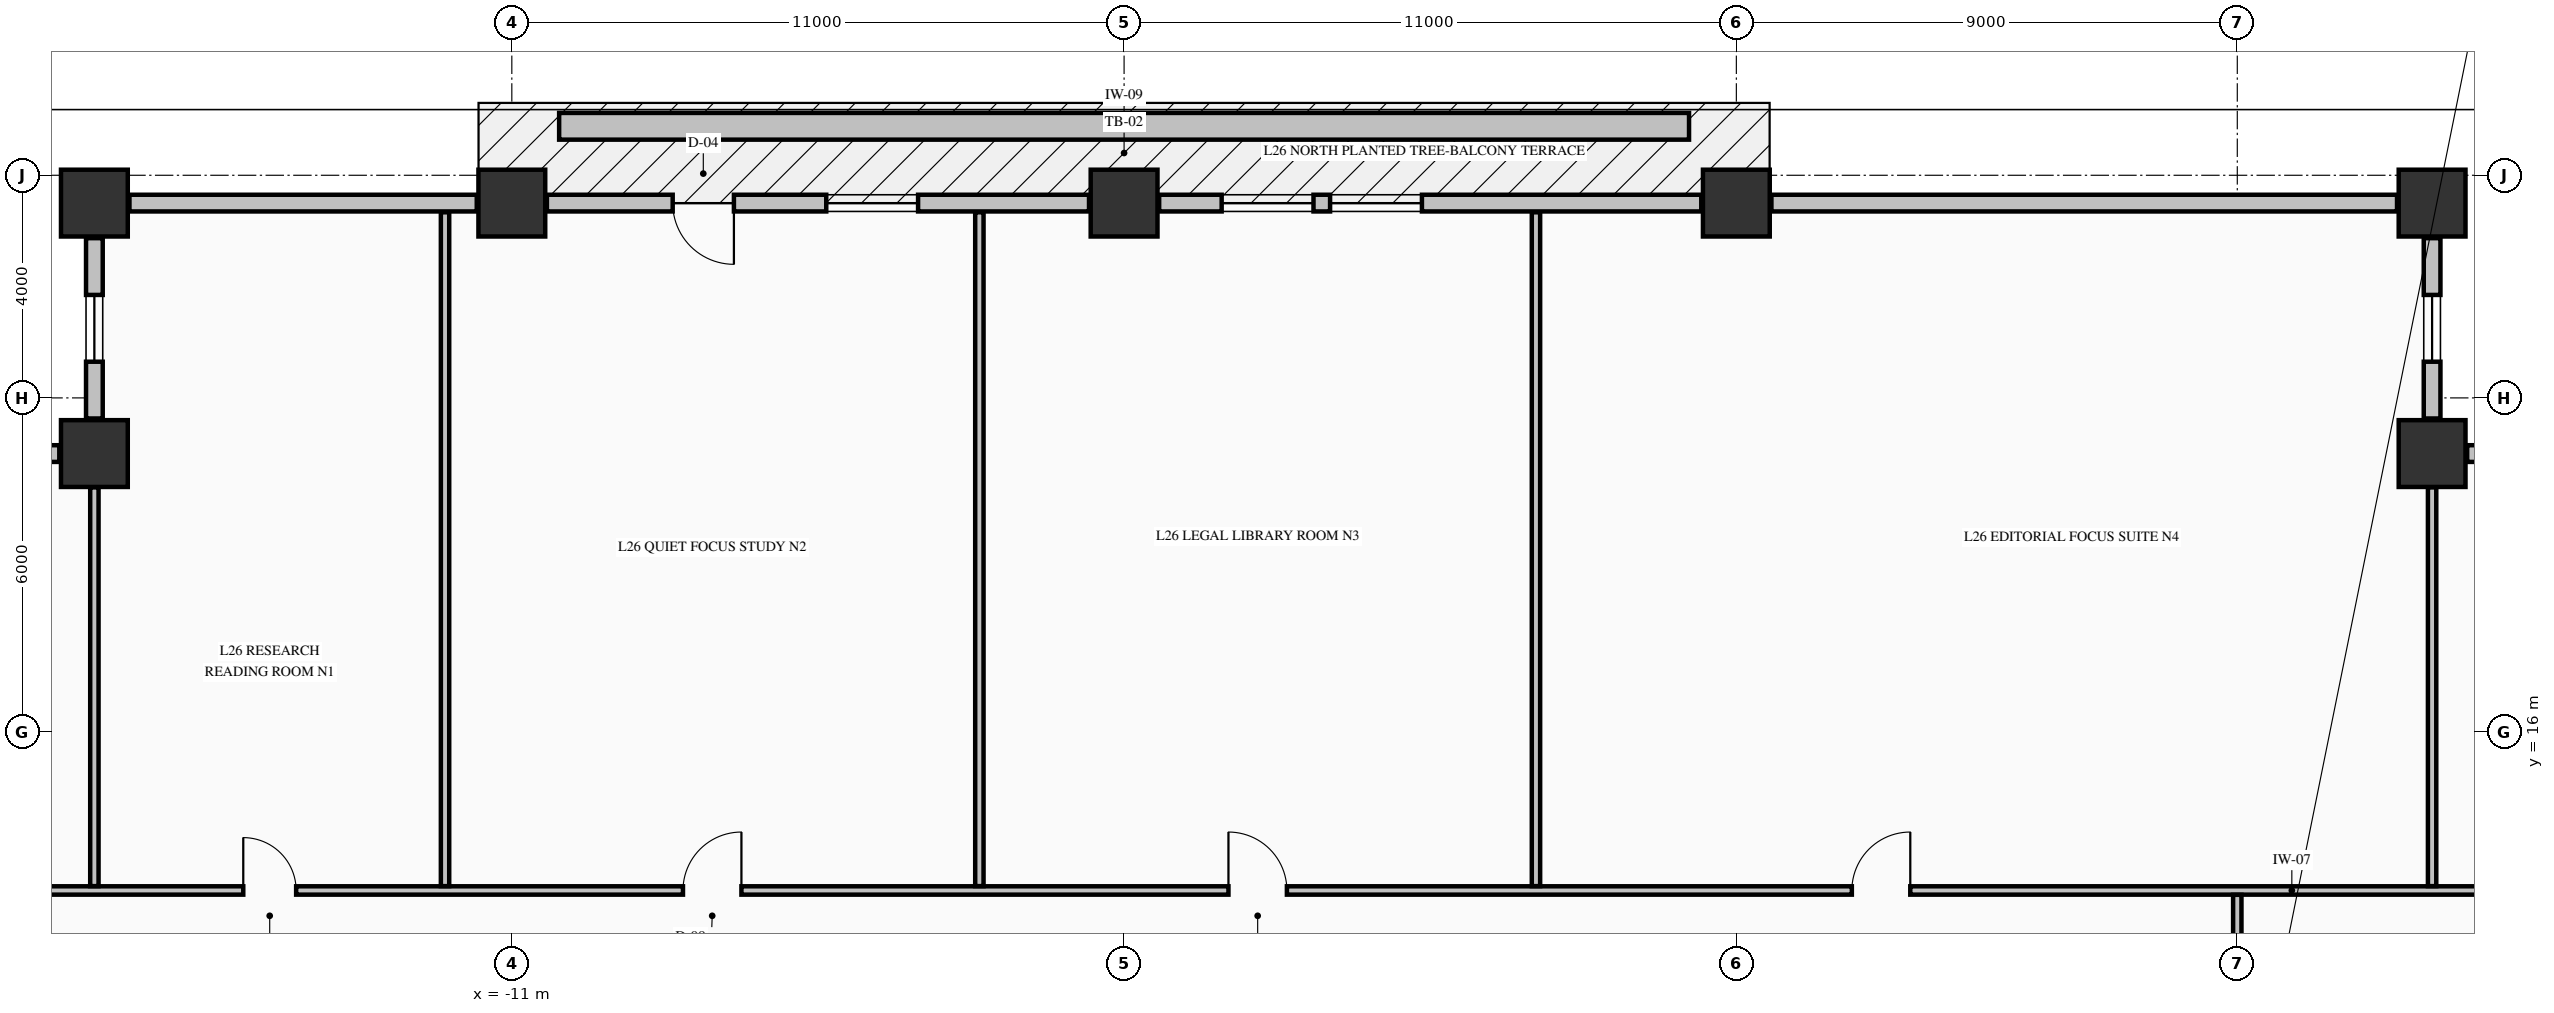
"""IFC4 building model, lengths in metres.
Left out: names, types, materials, properties, quantities, classifications, styles, units other than length and angle.
Written with IfcOpenShell. Run it as: python <this file> out.ifc"""

import sys

from ifc_helpers import new_model, si_unit, direction, frame, frame_2d, origin, origin_2d, place, context, subcontext, project, spatial, rectangle, extrude, element, fill, save


model = new_model("IFC4")
c1 = context("Model", 3, precision=1e-05, world=origin(), true_north=direction((0.0, 1.0)))
c2 = subcontext(c1, "Body", "Model", "MODEL_VIEW")
j1 = project(units=[si_unit("LENGTHUNIT", "METRE"), si_unit("PLANEANGLEUNIT", "RADIAN")], contexts=[c1])
p1 = place(None, origin())
s1 = spatial("IfcSite", under=j1, at=p1, CompositionType="ELEMENT")
p2 = place(p1, origin())
s2 = spatial("IfcBuilding", under=s1, at=p2, CompositionType="ELEMENT")
p3 = place(p2, frame((0.0, 0.0, 105.64)))
s3 = spatial("IfcBuildingStorey", under=s2, at=p3, CompositionType="ELEMENT", Elevation=105.64)
for number, where, z_axis, x_axis in (
    (1, (-18.5, 25.5, -0.25), (0.0, 0.0, 1.0), (1.0, 0.0, 0.0)),
    (2, (-11.0, 25.5, -0.25), (0.0, 0.0, 1.0), (1.0, 0.0, 0.0)),
    (3, (0.0, 25.5, -0.25), (0.0, 0.0, 1.0), (1.0, 0.0, 0.0)),
    (4, (11.0, 25.5, -0.25), (0.0, 0.0, 1.0), (1.0, 0.0, 0.0)),
    (5, (23.5, 25.5, -0.25), (0.0, 0.0, 1.0), (1.0, 0.0, 0.0)),
    (6, (23.5, 21.0, -0.25), (0.0, 0.0, 1.0), (1.0, 0.0, 0.0)),
    (7, (-18.5, 21.0, -0.25), (0.0, 0.0, 1.0), (1.0, 0.0, 0.0)),
):
    element("IfcColumn", number, at=place(p3, frame(where, z_axis=z_axis, x_axis=x_axis)), inside=s3, PredefinedType="COLUMN", context=c2, shape_type="SweptSolid", body=[
        extrude(rectangle(XDim=1.2, YDim=1.2, at=origin_2d()), origin(), (0.0, 0.0, 1.0), 3.57),
    ])
p4 = place(p3, frame((27.37, 21.0, 0.0), z_axis=(0.0, 0.0, 1.0), x_axis=(-1.0, 0.0, 0.0)))
e8 = element("IfcWall", 8, at=p4, inside=s3, PredefinedType="STANDARD", context=c2, shape_type="SweptSolid", body=[
    extrude(rectangle(XDim=3.24, YDim=0.3, at=frame_2d((1.62, 0.0))), origin(), (0.0, 0.0, 1.0), 2.712),
])
p5 = place(p4, frame((1.02, 0.0, 0.82)))
e9 = element("IfcOpeningElement", 9, at=p5, cuts=e8, PredefinedType="OPENING", context=c2, shape_type="SweptSolid", body=[
    extrude(rectangle(XDim=1.2, YDim=1.65, at=frame_2d((0.6, 0.825))), frame((0.0, 0.16, 0.0), z_axis=(0.0, -1.0, 0.0), x_axis=(1.0, 0.0, 0.0)), (0.0, 0.0, 1.0), 0.32),
])
p6 = place(p3, frame((23.5, 21.63, 0.0), z_axis=(0.0, 0.0, 1.0), x_axis=(0.0, 1.0, 0.0)))
e10 = element("IfcWall", 10, at=p6, inside=s3, PredefinedType="STANDARD", context=c2, shape_type="SweptSolid", body=[
    extrude(rectangle(XDim=3.24, YDim=0.3, at=frame_2d((1.62, 0.0))), origin(), (0.0, 0.0, 1.0), 2.712),
])
p7 = place(p6, frame((1.02, 0.0, 0.82)))
e11 = element("IfcOpeningElement", 11, at=p7, cuts=e10, PredefinedType="OPENING", context=c2, shape_type="SweptSolid", body=[
    extrude(rectangle(XDim=1.2, YDim=1.65, at=frame_2d((0.6, 0.825))), frame((0.0, 0.16, 0.0), z_axis=(0.0, -1.0, 0.0), x_axis=(1.0, 0.0, 0.0)), (0.0, 0.0, 1.0), 0.32),
])
p8 = place(p3, frame((-18.5, 24.87, 0.0), z_axis=(0.0, 0.0, 1.0), x_axis=(0.0, -1.0, 0.0)))
e12 = element("IfcWall", 12, at=p8, inside=s3, PredefinedType="STANDARD", context=c2, shape_type="SweptSolid", body=[
    extrude(rectangle(XDim=3.24, YDim=0.3, at=frame_2d((1.62, 0.0))), origin(), (0.0, 0.0, 1.0), 2.712),
])
p9 = place(p8, frame((1.02, 0.0, 0.82)))
e13 = element("IfcOpeningElement", 13, at=p9, cuts=e12, PredefinedType="OPENING", context=c2, shape_type="SweptSolid", body=[
    extrude(rectangle(XDim=1.2, YDim=1.65, at=frame_2d((0.6, 0.825))), frame((0.0, 0.16, 0.0), z_axis=(0.0, -1.0, 0.0), x_axis=(1.0, 0.0, 0.0)), (0.0, 0.0, 1.0), 0.32),
])
p10 = place(p3, frame((-19.13, 21.0, 0.0), z_axis=(0.0, 0.0, 1.0), x_axis=(-1.0, 0.0, 0.0)))
e14 = element("IfcWall", 14, at=p10, inside=s3, PredefinedType="STANDARD", context=c2, shape_type="SweptSolid", body=[
    extrude(rectangle(XDim=3.24, YDim=0.3, at=frame_2d((1.62, 0.0))), origin(), (0.0, 0.0, 1.0), 2.712),
])
p11 = place(p10, frame((1.02, 0.0, 0.82)))
e15 = element("IfcOpeningElement", 15, at=p11, cuts=e14, PredefinedType="OPENING", context=c2, shape_type="SweptSolid", body=[
    extrude(rectangle(XDim=1.2, YDim=1.65, at=frame_2d((0.6, 0.825))), frame((0.0, 0.16, 0.0), z_axis=(0.0, -1.0, 0.0), x_axis=(1.0, 0.0, 0.0)), (0.0, 0.0, 1.0), 0.32),
])
p12 = place(p3, frame((-11.63, 25.5, 0.0), z_axis=(0.0, 0.0, 1.0), x_axis=(-1.0, 0.0, 0.0)))
e16 = element("IfcWall", 16, at=p12, inside=s3, PredefinedType="STANDARD", context=c2, shape_type="SweptSolid", body=[
    extrude(rectangle(XDim=6.24, YDim=0.3, at=frame_2d((3.12, 0.0))), origin(), (0.0, 0.0, 1.0), 2.712),
])
p13 = place(p3, frame((-0.63, 25.5, 0.0), z_axis=(0.0, 0.0, 1.0), x_axis=(-1.0, 0.0, 0.0)))
e17 = element("IfcWall", 17, at=p13, inside=s3, PredefinedType="STANDARD", context=c2, shape_type="SweptSolid", body=[
    extrude(rectangle(XDim=9.74, YDim=0.3, at=frame_2d((4.87, 0.0))), origin(), (0.0, 0.0, 1.0), 2.712),
])
p14 = place(p13, frame((6.38, 0.0, 0.0)))
e18 = element("IfcOpeningElement", 18, at=p14, cuts=e17, PredefinedType="OPENING", context=c2, shape_type="SweptSolid", body=[
    extrude(rectangle(XDim=1.1, YDim=2.15, at=frame_2d((0.55, 1.075))), frame((0.0, 0.16, 0.0), z_axis=(0.0, -1.0, 0.0), x_axis=(1.0, 0.0, 0.0)), (0.0, 0.0, 1.0), 0.32),
])
p15 = place(p13, frame((3.071, 0.0, 0.8)))
e19 = element("IfcOpeningElement", 19, at=p15, cuts=e17, PredefinedType="OPENING", context=c2, shape_type="SweptSolid", body=[
    extrude(rectangle(XDim=1.65, YDim=1.7, at=frame_2d((0.825, 0.85))), frame((0.0, 0.16, 0.0), z_axis=(0.0, -1.0, 0.0), x_axis=(1.0, 0.0, 0.0)), (0.0, 0.0, 1.0), 0.32),
])
p16 = place(p3, frame((10.37, 25.5, 0.0), z_axis=(0.0, 0.0, 1.0), x_axis=(-1.0, 0.0, 0.0)))
e20 = element("IfcWall", 20, at=p16, inside=s3, PredefinedType="STANDARD", context=c2, shape_type="SweptSolid", body=[
    extrude(rectangle(XDim=9.74, YDim=0.3, at=frame_2d((4.87, 0.0))), origin(), (0.0, 0.0, 1.0), 2.712),
])
p17 = place(p16, frame((5.019, 0.0, 0.8)))
e21 = element("IfcOpeningElement", 21, at=p17, cuts=e20, PredefinedType="OPENING", context=c2, shape_type="SweptSolid", body=[
    extrude(rectangle(XDim=1.65, YDim=1.7, at=frame_2d((0.825, 0.85))), frame((0.0, 0.16, 0.0), z_axis=(0.0, -1.0, 0.0), x_axis=(1.0, 0.0, 0.0)), (0.0, 0.0, 1.0), 0.32),
])
p18 = place(p16, frame((6.967, 0.0, 0.8)))
e22 = element("IfcOpeningElement", 22, at=p18, cuts=e20, PredefinedType="OPENING", context=c2, shape_type="SweptSolid", body=[
    extrude(rectangle(XDim=1.65, YDim=1.7, at=frame_2d((0.825, 0.85))), frame((0.0, 0.16, 0.0), z_axis=(0.0, -1.0, 0.0), x_axis=(1.0, 0.0, 0.0)), (0.0, 0.0, 1.0), 0.32),
])
p19 = place(p3, frame((22.87, 25.5, 0.0), z_axis=(0.0, 0.0, 1.0), x_axis=(-1.0, 0.0, 0.0)))
e23 = element("IfcWall", 23, at=p19, inside=s3, PredefinedType="STANDARD", context=c2, shape_type="SweptSolid", body=[
    extrude(rectangle(XDim=11.24, YDim=0.3, at=frame_2d((5.62, 0.0))), origin(), (0.0, 0.0, 1.0), 2.712),
])
p20 = place(p3, frame((-22.835, 13.15, 0.0), z_axis=(0.0, 0.0, 1.0), x_axis=(1.0, 0.0, 0.0)))
e24 = element("IfcWall", 24, at=p20, inside=s3, PredefinedType="PARTITIONING", context=c2, shape_type="SweptSolid", body=[
    extrude(rectangle(XDim=50.67, YDim=0.15, at=frame_2d((25.335, 0.0))), origin(), (0.0, 0.0, 1.0), 3.32),
])
p21 = place(p20, frame((7.01, 0.0, 0.0)))
e25 = element("IfcOpeningElement", 25, at=p21, cuts=e24, PredefinedType="OPENING", context=c2, shape_type="SweptSolid", body=[
    extrude(rectangle(XDim=0.95, YDim=2.15, at=frame_2d((0.475, 1.075))), frame((0.0, 0.085, 0.0), z_axis=(0.0, -1.0, 0.0), x_axis=(1.0, 0.0, 0.0)), (0.0, 0.0, 1.0), 0.17),
])
p22 = place(p20, frame((14.91, 0.0, 0.0)))
e26 = element("IfcOpeningElement", 26, at=p22, cuts=e24, PredefinedType="OPENING", context=c2, shape_type="SweptSolid", body=[
    extrude(rectangle(XDim=1.05, YDim=2.15, at=frame_2d((0.525, 1.075))), frame((0.0, 0.085, 0.0), z_axis=(0.0, -1.0, 0.0), x_axis=(1.0, 0.0, 0.0)), (0.0, 0.0, 1.0), 0.17),
])
p23 = place(p20, frame((24.71, 0.0, 0.0)))
e27 = element("IfcOpeningElement", 27, at=p23, cuts=e24, PredefinedType="OPENING", context=c2, shape_type="SweptSolid", body=[
    extrude(rectangle(XDim=1.05, YDim=2.15, at=frame_2d((0.525, 1.075))), frame((0.0, 0.085, 0.0), z_axis=(0.0, -1.0, 0.0), x_axis=(1.0, 0.0, 0.0)), (0.0, 0.0, 1.0), 0.17),
])
p24 = place(p20, frame((35.91, 0.0, 0.0)))
e28 = element("IfcOpeningElement", 28, at=p24, cuts=e24, PredefinedType="OPENING", context=c2, shape_type="SweptSolid", body=[
    extrude(rectangle(XDim=1.05, YDim=2.15, at=frame_2d((0.525, 1.075))), frame((0.0, 0.085, 0.0), z_axis=(0.0, -1.0, 0.0), x_axis=(1.0, 0.0, 0.0)), (0.0, 0.0, 1.0), 0.17),
])
p25 = place(p3, frame((-18.5, 13.228, 0.0), z_axis=(0.0, 0.0, 1.0), x_axis=(0.0, 1.0, 0.0)))
e29 = element("IfcWall", 29, at=p25, inside=s3, PredefinedType="PARTITIONING", context=c2, shape_type="SweptSolid", body=[
    extrude(rectangle(XDim=7.166, YDim=0.15, at=frame_2d((3.583, 0.0))), origin(), (0.0, 0.0, 1.0), 3.32),
])
for number, where, z_axis, x_axis in (
    (30, (-12.2, 13.228, 0.0), (0.0, 0.0, 1.0), (0.0, 1.0, 0.0)),
    (31, (-2.6, 13.228, 0.0), (0.0, 0.0, 1.0), (0.0, 1.0, 0.0)),
    (32, (7.4, 13.228, 0.0), (0.0, 0.0, 1.0), (0.0, 1.0, 0.0)),
):
    element("IfcWall", number, at=place(p3, frame(where, z_axis=z_axis, x_axis=x_axis)), inside=s3, PredefinedType="PARTITIONING", context=c2, shape_type="SweptSolid", body=[
        extrude(rectangle(XDim=12.107, YDim=0.15, at=frame_2d((6.053, 0.0))), origin(), (0.0, 0.0, 1.0), 3.32),
    ])
p26 = place(p3, frame((20.0, 11.006, 0.0), z_axis=(0.0, 0.0, 1.0), x_axis=(0.0, 1.0, 0.0)))
e33 = element("IfcWall", 33, at=p26, inside=s3, PredefinedType="PARTITIONING", context=c2, shape_type="SweptSolid", body=[
    extrude(rectangle(XDim=2.066, YDim=0.15, at=frame_2d((1.033, 0.0))), origin(), (0.0, 0.0, 1.0), 2.81),
])
p27 = place(p26, frame((0.339, 0.0, 0.0)))
e34 = element("IfcOpeningElement", 34, at=p27, cuts=e33, PredefinedType="OPENING", context=c2, shape_type="SweptSolid", body=[
    extrude(rectangle(XDim=0.95, YDim=2.15, at=frame_2d((0.475, 1.075))), frame((0.0, 0.085, 0.0), z_axis=(0.0, -1.0, 0.0), x_axis=(1.0, 0.0, 0.0)), (0.0, 0.0, 1.0), 0.17),
])
p28 = place(p3, frame((23.5, 13.228, 0.0), z_axis=(0.0, 0.0, 1.0), x_axis=(0.0, 1.0, 0.0)))
e35 = element("IfcWall", 35, at=p28, inside=s3, PredefinedType="PARTITIONING", context=c2, shape_type="SweptSolid", body=[
    extrude(rectangle(XDim=7.166, YDim=0.15, at=frame_2d((3.583, 0.0))), origin(), (0.0, 0.0, 1.0), 3.32),
])
p29 = place(p3, frame((-10.15, 26.88, -0.04), z_axis=(0.0, 0.0, 1.0), x_axis=(1.0, 0.0, 0.0)))
e36 = element("IfcWall", 36, at=p29, inside=s3, PredefinedType="PARAPET", context=c2, shape_type="SweptSolid", body=[
    extrude(rectangle(XDim=20.3, YDim=0.48, at=frame_2d((10.15, 0.0))), origin(), (0.0, 0.0, 1.0), 0.52),
])
p30 = place(p7, origin())
e37 = element("IfcWindow", 37, at=p30, inside=s3, PartitioningType="SINGLE_PANEL", PredefinedType="WINDOW", context=c2, shape_type="SweptSolid", body=[
    extrude(rectangle(XDim=1.2, YDim=1.65, at=frame_2d((0.6, 0.825))), frame((0.0, 0.03, 0.0), z_axis=(0.0, -1.0, 0.0), x_axis=(1.0, 0.0, 0.0)), (0.0, 0.0, 1.0), 0.06),
])
fill(e11, e37)
p31 = place(p9, origin())
e38 = element("IfcWindow", 38, at=p31, inside=s3, PartitioningType="SINGLE_PANEL", PredefinedType="WINDOW", context=c2, shape_type="SweptSolid", body=[
    extrude(rectangle(XDim=1.2, YDim=1.65, at=frame_2d((0.6, 0.825))), frame((0.0, 0.03, 0.0), z_axis=(0.0, -1.0, 0.0), x_axis=(1.0, 0.0, 0.0)), (0.0, 0.0, 1.0), 0.06),
])
fill(e13, e38)
p32 = place(p14, origin())
e39 = element("IfcDoor", 39, at=p32, inside=s3, OperationType="SINGLE_SWING_LEFT", PredefinedType="DOOR", context=c2, shape_type="SweptSolid", body=[
    extrude(rectangle(XDim=1.1, YDim=2.15, at=frame_2d((0.55, 1.075))), frame((0.0, 0.025, 0.0), z_axis=(0.0, -1.0, 0.0), x_axis=(1.0, 0.0, 0.0)), (0.0, 0.0, 1.0), 0.05),
])
fill(e18, e39)
p33 = place(p15, origin())
e40 = element("IfcWindow", 40, at=p33, inside=s3, PartitioningType="SINGLE_PANEL", PredefinedType="WINDOW", context=c2, shape_type="SweptSolid", body=[
    extrude(rectangle(XDim=1.65, YDim=1.7, at=frame_2d((0.825, 0.85))), frame((0.0, 0.03, 0.0), z_axis=(0.0, -1.0, 0.0), x_axis=(1.0, 0.0, 0.0)), (0.0, 0.0, 1.0), 0.06),
])
fill(e19, e40)
p34 = place(p17, origin())
e41 = element("IfcWindow", 41, at=p34, inside=s3, PartitioningType="SINGLE_PANEL", PredefinedType="WINDOW", context=c2, shape_type="SweptSolid", body=[
    extrude(rectangle(XDim=1.65, YDim=1.7, at=frame_2d((0.825, 0.85))), frame((0.0, 0.03, 0.0), z_axis=(0.0, -1.0, 0.0), x_axis=(1.0, 0.0, 0.0)), (0.0, 0.0, 1.0), 0.06),
])
fill(e21, e41)
p35 = place(p18, origin())
e42 = element("IfcWindow", 42, at=p35, inside=s3, PartitioningType="SINGLE_PANEL", PredefinedType="WINDOW", context=c2, shape_type="SweptSolid", body=[
    extrude(rectangle(XDim=1.65, YDim=1.7, at=frame_2d((0.825, 0.85))), frame((0.0, 0.03, 0.0), z_axis=(0.0, -1.0, 0.0), x_axis=(1.0, 0.0, 0.0)), (0.0, 0.0, 1.0), 0.06),
])
fill(e22, e42)
p36 = place(p21, origin())
e43 = element("IfcDoor", 43, at=p36, inside=s3, OperationType="SINGLE_SWING_LEFT", PredefinedType="DOOR", context=c2, shape_type="SweptSolid", body=[
    extrude(rectangle(XDim=0.95, YDim=2.15, at=frame_2d((0.475, 1.075))), frame((0.0, 0.025, 0.0), z_axis=(0.0, -1.0, 0.0), x_axis=(1.0, 0.0, 0.0)), (0.0, 0.0, 1.0), 0.05),
])
fill(e25, e43)
p37 = place(p22, origin())
e44 = element("IfcDoor", 44, at=p37, inside=s3, OperationType="SINGLE_SWING_RIGHT", PredefinedType="DOOR", context=c2, shape_type="SweptSolid", body=[
    extrude(rectangle(XDim=1.05, YDim=2.15, at=frame_2d((0.525, 1.075))), frame((0.0, 0.025, 0.0), z_axis=(0.0, -1.0, 0.0), x_axis=(1.0, 0.0, 0.0)), (0.0, 0.0, 1.0), 0.05),
])
fill(e26, e44)
p38 = place(p23, origin())
e45 = element("IfcDoor", 45, at=p38, inside=s3, OperationType="SINGLE_SWING_LEFT", PredefinedType="DOOR", context=c2, shape_type="SweptSolid", body=[
    extrude(rectangle(XDim=1.05, YDim=2.15, at=frame_2d((0.525, 1.075))), frame((0.0, 0.025, 0.0), z_axis=(0.0, -1.0, 0.0), x_axis=(1.0, 0.0, 0.0)), (0.0, 0.0, 1.0), 0.05),
])
fill(e27, e45)
p39 = place(p24, origin())
e46 = element("IfcDoor", 46, at=p39, inside=s3, OperationType="SINGLE_SWING_RIGHT", PredefinedType="DOOR", context=c2, shape_type="SweptSolid", body=[
    extrude(rectangle(XDim=1.05, YDim=2.15, at=frame_2d((0.525, 1.075))), frame((0.0, 0.025, 0.0), z_axis=(0.0, -1.0, 0.0), x_axis=(1.0, 0.0, 0.0)), (0.0, 0.0, 1.0), 0.05),
])
fill(e28, e46)
save(model, sys.argv[1])
